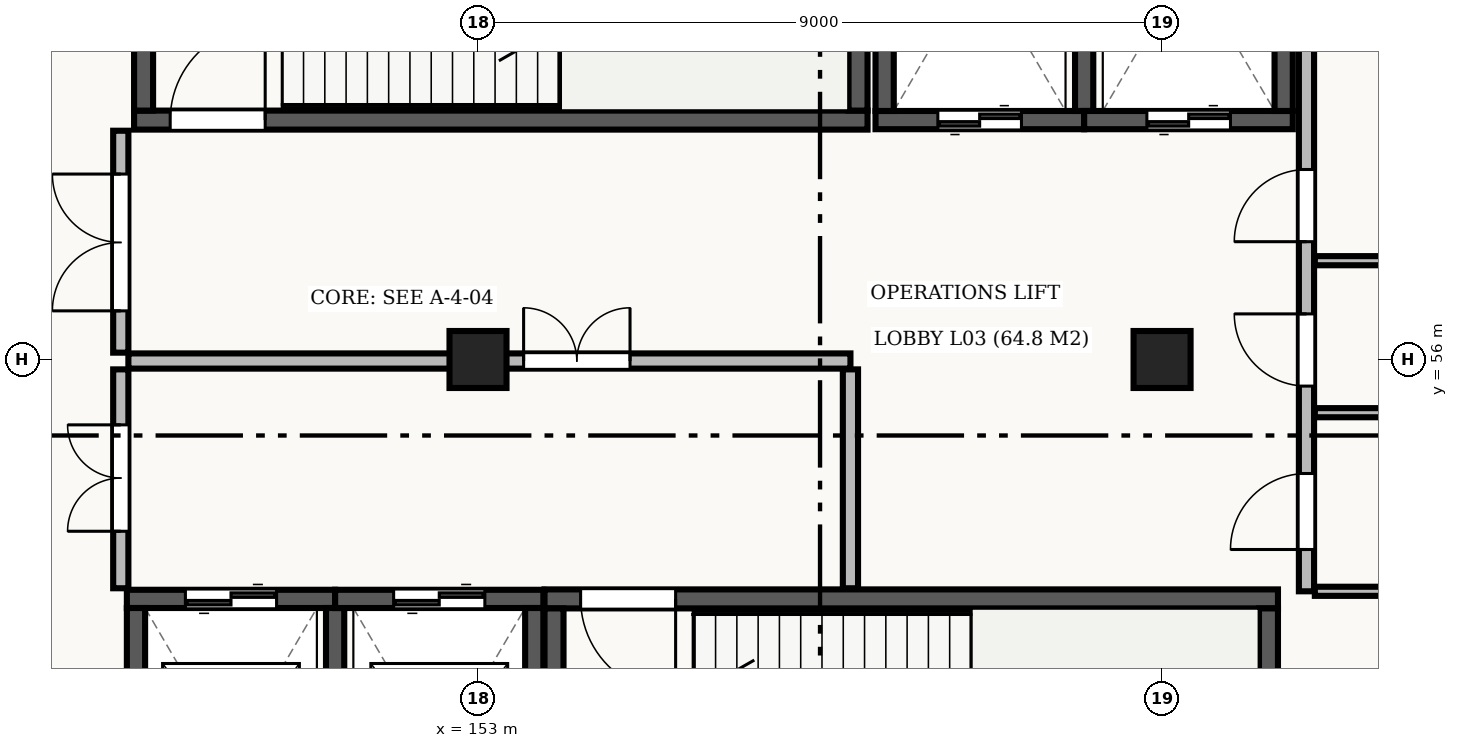
"""IFC4 building model, lengths in metres.
Left out: names, types, materials, properties, quantities, classifications, styles, units other than length and angle.
Written with IfcOpenShell. Run it as: python <this file> out.ifc"""

import sys

from ifc_helpers import new_model, si_unit, direction, frame, frame_2d, origin, origin_2d, place, context, subcontext, project, spatial, rectangle, extrude, element, fill, save


model = new_model("IFC4")
c1 = context("Model", 3, precision=1e-05, world=origin(), true_north=direction((0.0, 1.0)))
c2 = subcontext(c1, "Body", "Model", "MODEL_VIEW")
j1 = project(units=[si_unit("LENGTHUNIT", "METRE"), si_unit("PLANEANGLEUNIT", "RADIAN")], contexts=[c1])
p1 = place(None, origin())
s1 = spatial("IfcSite", under=j1, at=p1, CompositionType="ELEMENT")
p2 = place(p1, origin())
s2 = spatial("IfcBuilding", under=s1, at=p2, CompositionType="ELEMENT")
p3 = place(p2, frame((0.0, 0.0, 14.4)))
s3 = spatial("IfcBuildingStorey", under=s2, at=p3, CompositionType="ELEMENT", Elevation=14.4)
for number, where, z_axis, x_axis in (
    (1, (153.0, 56.0, 0.0), (0.0, 0.0, 1.0), (1.0, 0.0, 0.0)),
    (2, (162.0, 56.0, 0.0), (0.0, 0.0, 1.0), (1.0, 0.0, 0.0)),
):
    element("IfcColumn", number, at=place(p3, frame(where, z_axis=z_axis, x_axis=x_axis)), inside=s3, PredefinedType="COLUMN", context=c2, shape_type="SweptSolid", body=[
        extrude(rectangle(XDim=0.75, YDim=0.75, at=origin_2d()), origin(), (0.0, 0.0, 1.0), 4.2),
    ])
p4 = place(p3, frame((148.475, 59.15, 0.0), z_axis=(0.0, 0.0, 1.0), x_axis=(1.0, 0.0, 0.0)))
e3 = element("IfcWall", 3, at=p4, inside=s3, PredefinedType="SHEAR", context=c2, shape_type="SweptSolid", body=[
    extrude(rectangle(XDim=9.65, YDim=0.25, at=frame_2d((4.825, 0.0))), origin(), (0.0, 0.0, 1.0), 3.9),
])
p5 = place(p4, frame((0.475, 0.0, 0.0)))
e4 = element("IfcOpeningElement", 4, at=p5, cuts=e3, PredefinedType="OPENING", context=c2, shape_type="SweptSolid", body=[
    extrude(rectangle(XDim=1.25, YDim=2.15, at=frame_2d((0.625, 1.075))), frame((0.0, 0.137, 0.0), z_axis=(0.0, -1.0, 0.0), x_axis=(1.0, 0.0, 0.0)), (0.0, 0.0, 1.0), 0.274),
])
for number, where, z_axis, x_axis in (
    (5, (148.6, 63.125, 0.0), (0.0, 0.0, 1.0), (0.0, -1.0, 0.0)),
    (6, (158.0, 59.275, 0.0), (0.0, 0.0, 1.0), (0.0, 1.0, 0.0)),
):
    element("IfcWall", number, at=place(p3, frame(where, z_axis=z_axis, x_axis=x_axis)), inside=s3, PredefinedType="SHEAR", context=c2, shape_type="SweptSolid", body=[
        extrude(rectangle(XDim=3.85, YDim=0.25, at=frame_2d((1.925, 0.0))), origin(), (0.0, 0.0, 1.0), 3.9),
    ])
p6 = place(p3, frame((163.525, 52.85, 0.0), z_axis=(0.0, 0.0, 1.0), x_axis=(-1.0, 0.0, 0.0)))
e7 = element("IfcWall", 7, at=p6, inside=s3, PredefinedType="SHEAR", context=c2, shape_type="SweptSolid", body=[
    extrude(rectangle(XDim=9.65, YDim=0.25, at=frame_2d((4.825, 0.0))), origin(), (0.0, 0.0, 1.0), 3.9),
])
p7 = place(p6, frame((7.925, 0.0, 0.0)))
e8 = element("IfcOpeningElement", 8, at=p7, cuts=e7, PredefinedType="OPENING", context=c2, shape_type="SweptSolid", body=[
    extrude(rectangle(XDim=1.25, YDim=2.15, at=frame_2d((0.625, 1.075))), frame((0.0, 0.137, 0.0), z_axis=(0.0, -1.0, 0.0), x_axis=(1.0, 0.0, 0.0)), (0.0, 0.0, 1.0), 0.274),
])
for number, where, z_axis, x_axis in (
    (9, (154.0, 52.725, 0.0), (0.0, 0.0, 1.0), (0.0, -1.0, 0.0)),
    (10, (163.4, 48.875, 0.0), (0.0, 0.0, 1.0), (0.0, 1.0, 0.0)),
):
    element("IfcWall", number, at=place(p3, frame(where, z_axis=z_axis, x_axis=x_axis)), inside=s3, PredefinedType="SHEAR", context=c2, shape_type="SweptSolid", body=[
        extrude(rectangle(XDim=3.85, YDim=0.25, at=frame_2d((1.925, 0.0))), origin(), (0.0, 0.0, 1.0), 3.9),
    ])
p8 = place(p3, frame((158.23, 59.15, 0.0), z_axis=(0.0, 0.0, 1.0), x_axis=(1.0, 0.0, 0.0)))
e11 = element("IfcWall", 11, at=p8, inside=s3, PredefinedType="SHEAR", context=c2, shape_type="SweptSolid", body=[
    extrude(rectangle(XDim=2.745, YDim=0.24, at=frame_2d((1.373, 0.0))), origin(), (0.0, 0.0, 1.0), 3.9),
])
p9 = place(p8, frame((0.82, 0.0, 0.0)))
e12 = element("IfcOpeningElement", 12, at=p9, cuts=e11, PredefinedType="OPENING", context=c2, shape_type="SweptSolid", body=[
    extrude(rectangle(XDim=1.1, YDim=2.2, at=frame_2d((0.55, 1.1))), frame((0.0, 0.132, 0.0), z_axis=(0.0, -1.0, 0.0), x_axis=(1.0, 0.0, 0.0)), (0.0, 0.0, 1.0), 0.264),
])
for number, where, z_axis, x_axis in (
    (13, (158.35, 63.13, 0.0), (0.0, 0.0, 1.0), (0.0, -1.0, 0.0)),
    (14, (160.975, 59.27, 0.0), (0.0, 0.0, 1.0), (0.0, 1.0, 0.0)),
):
    element("IfcWall", number, at=place(p3, frame(where, z_axis=z_axis, x_axis=x_axis)), inside=s3, PredefinedType="SHEAR", context=c2, shape_type="SweptSolid", body=[
        extrude(rectangle(XDim=3.86, YDim=0.24, at=frame_2d((1.93, 0.0))), origin(), (0.0, 0.0, 1.0), 3.9),
    ])
p10 = place(p3, frame((160.975, 59.15, 0.0), z_axis=(0.0, 0.0, 1.0), x_axis=(1.0, 0.0, 0.0)))
e15 = element("IfcWall", 15, at=p10, inside=s3, PredefinedType="SHEAR", context=c2, shape_type="SweptSolid", body=[
    extrude(rectangle(XDim=2.745, YDim=0.24, at=frame_2d((1.373, 0.0))), origin(), (0.0, 0.0, 1.0), 3.9),
])
p11 = place(p10, frame((0.825, 0.0, 0.0)))
e16 = element("IfcOpeningElement", 16, at=p11, cuts=e15, PredefinedType="OPENING", context=c2, shape_type="SweptSolid", body=[
    extrude(rectangle(XDim=1.1, YDim=2.2, at=frame_2d((0.55, 1.1))), frame((0.0, 0.132, 0.0), z_axis=(0.0, -1.0, 0.0), x_axis=(1.0, 0.0, 0.0)), (0.0, 0.0, 1.0), 0.264),
])
p12 = place(p3, frame((163.6, 59.27, 0.0), z_axis=(0.0, 0.0, 1.0), x_axis=(0.0, 1.0, 0.0)))
e17 = element("IfcWall", 17, at=p12, inside=s3, PredefinedType="SHEAR", context=c2, shape_type="SweptSolid", body=[
    extrude(rectangle(XDim=3.86, YDim=0.24, at=frame_2d((1.93, 0.0))), origin(), (0.0, 0.0, 1.0), 3.9),
])
p13 = place(p3, frame((151.12, 52.85, 0.0), z_axis=(0.0, 0.0, 1.0), x_axis=(-1.0, 0.0, 0.0)))
e18 = element("IfcWall", 18, at=p13, inside=s3, PredefinedType="SHEAR", context=c2, shape_type="SweptSolid", body=[
    extrude(rectangle(XDim=2.74, YDim=0.24, at=frame_2d((1.37, 0.0))), origin(), (0.0, 0.0, 1.0), 3.9),
])
p14 = place(p13, frame((0.77, 0.0, 0.0)))
e19 = element("IfcOpeningElement", 19, at=p14, cuts=e18, PredefinedType="OPENING", context=c2, shape_type="SweptSolid", body=[
    extrude(rectangle(XDim=1.2, YDim=2.2, at=frame_2d((0.6, 1.1))), frame((0.0, 0.132, 0.0), z_axis=(0.0, -1.0, 0.0), x_axis=(1.0, 0.0, 0.0)), (0.0, 0.0, 1.0), 0.264),
])
for number, where, z_axis, x_axis in (
    (20, (148.5, 52.73, 0.0), (0.0, 0.0, 1.0), (0.0, -1.0, 0.0)),
    (21, (151.12, 48.87, 0.0), (0.0, 0.0, 1.0), (0.0, 1.0, 0.0)),
):
    element("IfcWall", number, at=place(p3, frame(where, z_axis=z_axis, x_axis=x_axis)), inside=s3, PredefinedType="SHEAR", context=c2, shape_type="SweptSolid", body=[
        extrude(rectangle(XDim=3.86, YDim=0.24, at=frame_2d((1.93, 0.0))), origin(), (0.0, 0.0, 1.0), 3.9),
    ])
p15 = place(p3, frame((153.86, 52.85, 0.0), z_axis=(0.0, 0.0, 1.0), x_axis=(-1.0, 0.0, 0.0)))
e22 = element("IfcWall", 22, at=p15, inside=s3, PredefinedType="SHEAR", context=c2, shape_type="SweptSolid", body=[
    extrude(rectangle(XDim=2.74, YDim=0.24, at=frame_2d((1.37, 0.0))), origin(), (0.0, 0.0, 1.0), 3.9),
])
p16 = place(p15, frame((0.77, 0.0, 0.0)))
e23 = element("IfcOpeningElement", 23, at=p16, cuts=e22, PredefinedType="OPENING", context=c2, shape_type="SweptSolid", body=[
    extrude(rectangle(XDim=1.2, YDim=2.2, at=frame_2d((0.6, 1.1))), frame((0.0, 0.132, 0.0), z_axis=(0.0, -1.0, 0.0), x_axis=(1.0, 0.0, 0.0)), (0.0, 0.0, 1.0), 0.264),
])
p17 = place(p3, frame((153.74, 48.87, 0.0), z_axis=(0.0, 0.0, 1.0), x_axis=(0.0, 1.0, 0.0)))
e24 = element("IfcWall", 24, at=p17, inside=s3, PredefinedType="SHEAR", context=c2, shape_type="SweptSolid", body=[
    extrude(rectangle(XDim=3.86, YDim=0.24, at=frame_2d((1.93, 0.0))), origin(), (0.0, 0.0, 1.0), 3.9),
])
p18 = place(p3, frame((148.4, 55.98, 0.0), z_axis=(0.0, 0.0, 1.0), x_axis=(1.0, 0.0, 0.0)))
e25 = element("IfcWall", 25, at=p18, inside=s3, PredefinedType="STANDARD", context=c2, shape_type="SweptSolid", body=[
    extrude(rectangle(XDim=9.5, YDim=0.2, at=frame_2d((4.75, 0.0))), origin(), (0.0, 0.0, 1.0), 3.28),
])
p19 = place(p18, frame((5.2, 0.0, 0.0)))
e26 = element("IfcOpeningElement", 26, at=p19, cuts=e25, PredefinedType="OPENING", context=c2, shape_type="SweptSolid", body=[
    extrude(rectangle(XDim=1.4, YDim=2.2, at=frame_2d((0.7, 1.1))), frame((0.0, 0.112, 0.0), z_axis=(0.0, -1.0, 0.0), x_axis=(1.0, 0.0, 0.0)), (0.0, 0.0, 1.0), 0.224),
])
p20 = place(p3, frame((157.9, 52.99, 0.0), z_axis=(0.0, 0.0, 1.0), x_axis=(0.0, 1.0, 0.0)))
e27 = element("IfcWall", 27, at=p20, inside=s3, PredefinedType="STANDARD", context=c2, shape_type="SweptSolid", body=[
    extrude(rectangle(XDim=2.88, YDim=0.2, at=frame_2d((1.44, 0.0))), origin(), (0.0, 0.0, 1.0), 3.9),
])
p21 = place(p3, frame((148.3, 52.99, 0.0), z_axis=(0.0, 0.0, 1.0), x_axis=(0.0, 1.0, 0.0)))
e28 = element("IfcWall", 28, at=p21, inside=s3, PredefinedType="STANDARD", context=c2, shape_type="SweptSolid", body=[
    extrude(rectangle(XDim=2.88, YDim=0.2, at=frame_2d((1.44, 0.0))), origin(), (0.0, 0.0, 1.0), 3.9),
])
p22 = place(p21, frame((0.75, 0.0, 0.0)))
e29 = element("IfcOpeningElement", 29, at=p22, cuts=e28, PredefinedType="OPENING", context=c2, shape_type="SweptSolid", body=[
    extrude(rectangle(XDim=1.4, YDim=2.2, at=frame_2d((0.7, 1.1))), frame((0.0, 0.112, 0.0), z_axis=(0.0, -1.0, 0.0), x_axis=(1.0, 0.0, 0.0)), (0.0, 0.0, 1.0), 0.224),
])
p23 = place(p3, frame((148.3, 56.09, 0.0), z_axis=(0.0, 0.0, 1.0), x_axis=(0.0, 1.0, 0.0)))
e30 = element("IfcWall", 30, at=p23, inside=s3, PredefinedType="STANDARD", context=c2, shape_type="SweptSolid", body=[
    extrude(rectangle(XDim=2.92, YDim=0.2, at=frame_2d((1.46, 0.0))), origin(), (0.0, 0.0, 1.0), 3.9),
])
p24 = place(p23, frame((0.55, 0.0, 0.0)))
e31 = element("IfcOpeningElement", 31, at=p24, cuts=e30, PredefinedType="OPENING", context=c2, shape_type="SweptSolid", body=[
    extrude(rectangle(XDim=1.8, YDim=2.2, at=frame_2d((0.9, 1.1))), frame((0.0, 0.112, 0.0), z_axis=(0.0, -1.0, 0.0), x_axis=(1.0, 0.0, 0.0)), (0.0, 0.0, 1.0), 0.224),
])
p25 = place(p3, frame((163.9, 52.95, 0.0), z_axis=(0.0, 0.0, 1.0), x_axis=(0.0, 1.0, 0.0)))
e32 = element("IfcWall", 32, at=p25, inside=s3, PredefinedType="STANDARD", context=c2, shape_type="SweptSolid", body=[
    extrude(rectangle(XDim=10.3, YDim=0.2, at=frame_2d((5.15, 0.0))), origin(), (0.0, 0.0, 1.0), 3.9),
])
p26 = place(p25, frame((0.55, 0.0, 0.0)))
e33 = element("IfcOpeningElement", 33, at=p26, cuts=e32, PredefinedType="OPENING", context=c2, shape_type="SweptSolid", body=[
    extrude(rectangle(XDim=1.0, YDim=2.1, at=frame_2d((0.5, 1.05))), frame((0.0, 0.112, 0.0), z_axis=(0.0, -1.0, 0.0), x_axis=(1.0, 0.0, 0.0)), (0.0, 0.0, 1.0), 0.224),
])
p27 = place(p25, frame((2.7, 0.0, 0.0)))
e34 = element("IfcOpeningElement", 34, at=p27, cuts=e32, PredefinedType="OPENING", context=c2, shape_type="SweptSolid", body=[
    extrude(rectangle(XDim=0.95, YDim=2.1, at=frame_2d((0.475, 1.05))), frame((0.0, 0.112, 0.0), z_axis=(0.0, -1.0, 0.0), x_axis=(1.0, 0.0, 0.0)), (0.0, 0.0, 1.0), 0.224),
])
p28 = place(p25, frame((4.6, 0.0, 0.0)))
e35 = element("IfcOpeningElement", 35, at=p28, cuts=e32, PredefinedType="OPENING", context=c2, shape_type="SweptSolid", body=[
    extrude(rectangle(XDim=0.95, YDim=2.1, at=frame_2d((0.475, 1.05))), frame((0.0, 0.112, 0.0), z_axis=(0.0, -1.0, 0.0), x_axis=(1.0, 0.0, 0.0)), (0.0, 0.0, 1.0), 0.224),
])
for number, where, z_axis, x_axis in (
    (36, (164.01, 52.95, 0.0), (0.0, 0.0, 1.0), (1.0, 0.0, 0.0)),
    (37, (164.01, 55.3, 0.0), (0.0, 0.0, 1.0), (1.0, 0.0, 0.0)),
    (38, (164.01, 57.3, 0.0), (0.0, 0.0, 1.0), (1.0, 0.0, 0.0)),
):
    element("IfcWall", number, at=place(p3, frame(where, z_axis=z_axis, x_axis=x_axis)), inside=s3, PredefinedType="STANDARD", context=c2, shape_type="SweptSolid", body=[
        extrude(rectangle(XDim=6.825, YDim=0.12, at=frame_2d((3.413, 0.0))), origin(), (0.0, 0.0, 1.0), 3.9),
    ])
p29 = place(p5, origin())
e39 = element("IfcDoor", 39, at=p29, inside=s3, OperationType="SINGLE_SWING_RIGHT", PredefinedType="DOOR", context=c2, shape_type="SweptSolid", body=[
    extrude(rectangle(XDim=1.25, YDim=2.15, at=frame_2d((0.625, 1.075))), frame((0.0, 0.025, 0.0), z_axis=(0.0, -1.0, 0.0), x_axis=(1.0, 0.0, 0.0)), (0.0, 0.0, 1.0), 0.05),
])
fill(e4, e39)
p30 = place(p7, origin())
e40 = element("IfcDoor", 40, at=p30, inside=s3, OperationType="SINGLE_SWING_LEFT", PredefinedType="DOOR", context=c2, shape_type="SweptSolid", body=[
    extrude(rectangle(XDim=1.25, YDim=2.15, at=frame_2d((0.625, 1.075))), frame((0.0, 0.025, 0.0), z_axis=(0.0, -1.0, 0.0), x_axis=(1.0, 0.0, 0.0)), (0.0, 0.0, 1.0), 0.05),
])
fill(e8, e40)
p31 = place(p9, origin())
e41 = element("IfcDoor", 41, at=p31, inside=s3, OperationType="DOUBLE_DOOR_SLIDING", PredefinedType="DOOR", context=c2, shape_type="SweptSolid", body=[
    extrude(rectangle(XDim=1.1, YDim=2.2, at=frame_2d((0.55, 1.1))), frame((0.0, 0.025, 0.0), z_axis=(0.0, -1.0, 0.0), x_axis=(1.0, 0.0, 0.0)), (0.0, 0.0, 1.0), 0.05),
])
fill(e12, e41)
p32 = place(p11, origin())
e42 = element("IfcDoor", 42, at=p32, inside=s3, OperationType="DOUBLE_DOOR_SLIDING", PredefinedType="DOOR", context=c2, shape_type="SweptSolid", body=[
    extrude(rectangle(XDim=1.1, YDim=2.2, at=frame_2d((0.55, 1.1))), frame((0.0, 0.025, 0.0), z_axis=(0.0, -1.0, 0.0), x_axis=(1.0, 0.0, 0.0)), (0.0, 0.0, 1.0), 0.05),
])
fill(e16, e42)
p33 = place(p14, origin())
e43 = element("IfcDoor", 43, at=p33, inside=s3, OperationType="DOUBLE_DOOR_SLIDING", PredefinedType="DOOR", context=c2, shape_type="SweptSolid", body=[
    extrude(rectangle(XDim=1.2, YDim=2.2, at=frame_2d((0.6, 1.1))), frame((0.0, 0.025, 0.0), z_axis=(0.0, -1.0, 0.0), x_axis=(1.0, 0.0, 0.0)), (0.0, 0.0, 1.0), 0.05),
])
fill(e19, e43)
p34 = place(p16, origin())
e44 = element("IfcDoor", 44, at=p34, inside=s3, OperationType="DOUBLE_DOOR_SLIDING", PredefinedType="DOOR", context=c2, shape_type="SweptSolid", body=[
    extrude(rectangle(XDim=1.2, YDim=2.2, at=frame_2d((0.6, 1.1))), frame((0.0, 0.025, 0.0), z_axis=(0.0, -1.0, 0.0), x_axis=(1.0, 0.0, 0.0)), (0.0, 0.0, 1.0), 0.05),
])
fill(e23, e44)
p35 = place(p19, origin())
e45 = element("IfcDoor", 45, at=p35, inside=s3, OperationType="DOUBLE_DOOR_SINGLE_SWING", PredefinedType="DOOR", context=c2, shape_type="SweptSolid", body=[
    extrude(rectangle(XDim=1.4, YDim=2.2, at=frame_2d((0.7, 1.1))), frame((0.0, 0.025, 0.0), z_axis=(0.0, -1.0, 0.0), x_axis=(1.0, 0.0, 0.0)), (0.0, 0.0, 1.0), 0.05),
])
fill(e26, e45)
p36 = place(p22, origin())
e46 = element("IfcDoor", 46, at=p36, inside=s3, OperationType="DOUBLE_DOOR_SINGLE_SWING", PredefinedType="DOOR", context=c2, shape_type="SweptSolid", body=[
    extrude(rectangle(XDim=1.4, YDim=2.2, at=frame_2d((0.7, 1.1))), frame((0.0, 0.025, 0.0), z_axis=(0.0, -1.0, 0.0), x_axis=(1.0, 0.0, 0.0)), (0.0, 0.0, 1.0), 0.05),
])
fill(e29, e46)
p37 = place(p24, origin())
e47 = element("IfcDoor", 47, at=p37, inside=s3, OperationType="DOUBLE_DOOR_SINGLE_SWING", PredefinedType="DOOR", context=c2, shape_type="SweptSolid", body=[
    extrude(rectangle(XDim=1.8, YDim=2.2, at=frame_2d((0.9, 1.1))), frame((0.0, 0.025, 0.0), z_axis=(0.0, -1.0, 0.0), x_axis=(1.0, 0.0, 0.0)), (0.0, 0.0, 1.0), 0.05),
])
fill(e31, e47)
p38 = place(p26, origin())
e48 = element("IfcDoor", 48, at=p38, inside=s3, OperationType="SINGLE_SWING_LEFT", PredefinedType="DOOR", context=c2, shape_type="SweptSolid", body=[
    extrude(rectangle(XDim=1.0, YDim=2.1, at=frame_2d((0.5, 1.05))), frame((0.0, 0.025, 0.0), z_axis=(0.0, -1.0, 0.0), x_axis=(1.0, 0.0, 0.0)), (0.0, 0.0, 1.0), 0.05),
])
fill(e33, e48)
p39 = place(p27, origin())
e49 = element("IfcDoor", 49, at=p39, inside=s3, OperationType="SINGLE_SWING_RIGHT", PredefinedType="DOOR", context=c2, shape_type="SweptSolid", body=[
    extrude(rectangle(XDim=0.95, YDim=2.1, at=frame_2d((0.475, 1.05))), frame((0.0, 0.025, 0.0), z_axis=(0.0, -1.0, 0.0), x_axis=(1.0, 0.0, 0.0)), (0.0, 0.0, 1.0), 0.05),
])
fill(e34, e49)
p40 = place(p28, origin())
e50 = element("IfcDoor", 50, at=p40, inside=s3, OperationType="SINGLE_SWING_LEFT", PredefinedType="DOOR", context=c2, shape_type="SweptSolid", body=[
    extrude(rectangle(XDim=0.95, YDim=2.1, at=frame_2d((0.475, 1.05))), frame((0.0, 0.025, 0.0), z_axis=(0.0, -1.0, 0.0), x_axis=(1.0, 0.0, 0.0)), (0.0, 0.0, 1.0), 0.05),
])
fill(e35, e50)
save(model, sys.argv[1])
